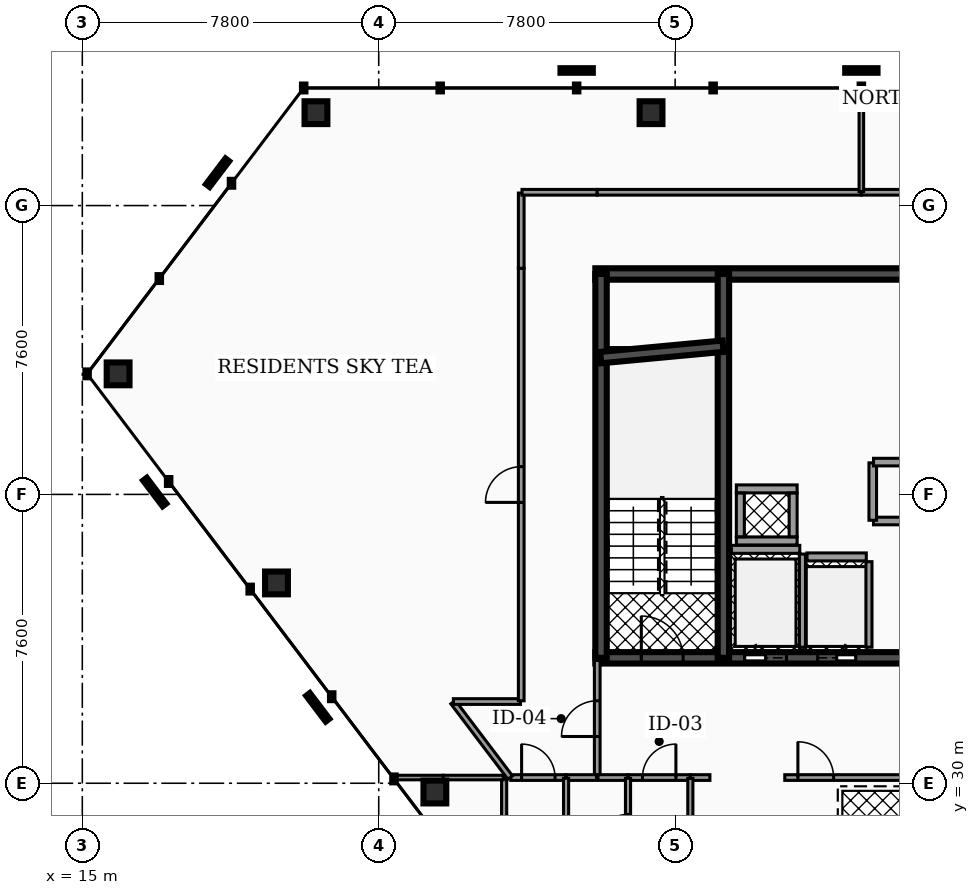
"""IFC4 building model, lengths in metres.
Left out: names, types, materials, properties, quantities, classifications, styles, units other than length and angle.
Written with IfcOpenShell. Run it as: python <this file> out.ifc"""

import sys

from ifc_helpers import new_model, si_unit, direction, frame, frame_2d, origin, origin_2d, place, context, subcontext, project, spatial, rectangle, hollow_rectangle, extrude, element, fill, save


model = new_model("IFC4")
c1 = context("Model", 3, precision=1e-05, world=origin(), true_north=direction((0.0, 1.0)))
c2 = subcontext(c1, "Body", "Model", "MODEL_VIEW")
j1 = project(units=[si_unit("LENGTHUNIT", "METRE"), si_unit("PLANEANGLEUNIT", "RADIAN")], contexts=[c1])
p1 = place(None, origin())
s1 = spatial("IfcSite", under=j1, at=p1, CompositionType="ELEMENT")
p2 = place(p1, origin())
s2 = spatial("IfcBuilding", under=s1, at=p2, CompositionType="ELEMENT")
p3 = place(p2, frame((0.0, 0.0, 218.96)))
s3 = spatial("IfcBuildingStorey", under=s2, at=p3, CompositionType="ELEMENT", Elevation=218.96)
p4 = place(p3, frame((28.5, 43.4, 0.0), z_axis=(0.0, 0.0, 1.0), x_axis=(1.0, 0.0, 0.0)))
e1 = element("IfcWall", 1, at=p4, inside=s3, PredefinedType="SHEAR", context=c2, shape_type="SweptSolid", body=[
    extrude(rectangle(XDim=19.86, YDim=0.3, at=frame_2d((9.93, 0.0))), origin(), (0.0, 0.0, 1.0), 3.18),
])
p5 = place(p3, frame((28.5, 33.3, 0.0), z_axis=(0.0, 0.0, 1.0), x_axis=(1.0, 0.0, 0.0)))
e2 = element("IfcWall", 2, at=p5, inside=s3, PredefinedType="SHEAR", context=c2, shape_type="SweptSolid", body=[
    extrude(rectangle(XDim=19.86, YDim=0.3, at=frame_2d((9.93, 0.0))), origin(), (0.0, 0.0, 1.0), 3.18),
])
p6 = place(p5, frame((3.93, 0.0, 0.0)))
e3 = element("IfcOpeningElement", 3, at=p6, cuts=e2, PredefinedType="OPENING", context=c2, shape_type="SweptSolid", body=[
    extrude(rectangle(XDim=1.1, YDim=2.15, at=frame_2d((0.55, 1.075))), frame((0.0, 0.16, 0.0), z_axis=(0.0, -1.0, 0.0), x_axis=(1.0, 0.0, 0.0)), (0.0, 0.0, 1.0), 0.32),
])
p7 = place(p5, frame((14.77, 0.0, 0.0)))
e4 = element("IfcOpeningElement", 4, at=p7, cuts=e2, PredefinedType="OPENING", context=c2, shape_type="SweptSolid", body=[
    extrude(rectangle(XDim=1.1, YDim=2.15, at=frame_2d((0.55, 1.075))), frame((0.0, 0.16, 0.0), z_axis=(0.0, -1.0, 0.0), x_axis=(1.0, 0.0, 0.0)), (0.0, 0.0, 1.0), 0.32),
])
p8 = place(p5, frame((11.25, 0.0, 0.0)))
e5 = element("IfcOpeningElement", 5, at=p8, cuts=e2, PredefinedType="OPENING", context=c2, shape_type="SweptSolid", body=[
    extrude(rectangle(XDim=1.0, YDim=2.1, at=frame_2d((0.5, 1.05))), frame((0.0, 0.16, 0.0), z_axis=(0.0, -1.0, 0.0), x_axis=(1.0, 0.0, 0.0)), (0.0, 0.0, 1.0), 0.32),
])
p9 = place(p5, frame((12.95, 0.0, 0.0)))
e6 = element("IfcOpeningElement", 6, at=p9, cuts=e2, PredefinedType="OPENING", context=c2, shape_type="SweptSolid", body=[
    extrude(rectangle(XDim=1.0, YDim=2.1, at=frame_2d((0.5, 1.05))), frame((0.0, 0.16, 0.0), z_axis=(0.0, -1.0, 0.0), x_axis=(1.0, 0.0, 0.0)), (0.0, 0.0, 1.0), 0.32),
])
p10 = place(p5, frame((5.85, 0.0, 0.0)))
e7 = element("IfcOpeningElement", 7, at=p10, cuts=e2, PredefinedType="OPENING", context=c2, shape_type="SweptSolid", body=[
    extrude(rectangle(XDim=1.0, YDim=2.1, at=frame_2d((0.5, 1.05))), frame((0.0, 0.16, 0.0), z_axis=(0.0, -1.0, 0.0), x_axis=(1.0, 0.0, 0.0)), (0.0, 0.0, 1.0), 0.32),
])
p11 = place(p5, frame((1.21, 0.0, 0.0)))
e8 = element("IfcOpeningElement", 8, at=p11, cuts=e2, PredefinedType="OPENING", context=c2, shape_type="SweptSolid", body=[
    extrude(rectangle(XDim=1.1, YDim=2.2, at=frame_2d((0.55, 1.1))), frame((0.0, 0.16, 0.0), z_axis=(0.0, -1.0, 0.0), x_axis=(1.0, 0.0, 0.0)), (0.0, 0.0, 1.0), 0.32),
])
p12 = place(p5, frame((9.34, 0.0, 0.0)))
e9 = element("IfcOpeningElement", 9, at=p12, cuts=e2, PredefinedType="OPENING", context=c2, shape_type="SweptSolid", body=[
    extrude(rectangle(XDim=1.12, YDim=2.05, at=frame_2d((0.56, 1.025))), frame((0.0, 0.16, 0.0), z_axis=(0.0, -1.0, 0.0), x_axis=(1.0, 0.0, 0.0)), (0.0, 0.0, 1.0), 0.32),
])
p13 = place(p5, frame((17.55, 0.0, 0.0)))
e10 = element("IfcOpeningElement", 10, at=p13, cuts=e2, PredefinedType="OPENING", context=c2, shape_type="SweptSolid", body=[
    extrude(rectangle(XDim=1.1, YDim=2.2, at=frame_2d((0.55, 1.1))), frame((0.0, 0.16, 0.0), z_axis=(0.0, -1.0, 0.0), x_axis=(1.0, 0.0, 0.0)), (0.0, 0.0, 1.0), 0.32),
])
for number, where, z_axis, x_axis in (
    (11, (28.65, 33.3, 0.0), (0.0, 0.0, 1.0), (0.0, 1.0, 0.0)),
    (12, (31.87, 33.3, 0.0), (0.0, 0.0, 1.0), (0.0, 1.0, 0.0)),
):
    element("IfcWall", number, at=place(p3, frame(where, z_axis=z_axis, x_axis=x_axis)), inside=s3, PredefinedType="SHEAR", context=c2, shape_type="SweptSolid", body=[
        extrude(rectangle(XDim=10.1, YDim=0.3, at=frame_2d((5.05, 0.0))), origin(), (0.0, 0.0, 1.0), 3.18),
    ])
p14 = place(p3, frame((28.64, 41.2, 0.0), z_axis=(0.0, 0.0, 1.0), x_axis=(0.995687118776, 0.092774789157, 0.0)))
e13 = element("IfcWall", 13, at=p14, inside=s3, PredefinedType="SHEAR", context=c2, shape_type="SweptSolid", body=[
    extrude(rectangle(XDim=3.234, YDim=0.3, at=frame_2d((1.617, 0.0))), origin(), (0.0, 0.0, 1.0), 3.18),
])
for number, where, z_axis, x_axis in (
    (14, (29.966, 47.644, 0.0), (0.0, 0.0, 1.0), (1.0, 0.0, 0.0)),
    (15, (21.148, 47.644, 0.0), (0.0, 0.0, 1.0), (1.0, 0.0, 0.0)),
    (16, (15.942, 40.772, 0.0), (0.0, 0.0, 1.0), (1.0, 0.0, 0.0)),
    (17, (20.11, 35.271, 0.0), (0.0, 0.0, 1.0), (1.0, 0.0, 0.0)),
    (18, (24.278, 29.769, 0.0), (0.0, 0.0, 1.0), (1.0, 0.0, 0.0)),
):
    element("IfcColumn", number, at=place(p3, frame(where, z_axis=z_axis, x_axis=x_axis)), inside=s3, PredefinedType="COLUMN", context=c2, shape_type="SweptSolid", body=[
        extrude(hollow_rectangle(XDim=0.6, YDim=0.6, WallThickness=0.03, at=origin_2d()), origin(), (0.0, 0.0, 1.0), 3.18),
    ])
p15 = place(p3, frame((32.08, 36.155, 0.0), z_axis=(0.0, 0.0, 1.0), x_axis=(1.0, 0.0, 0.0)))
e19 = element("IfcWall", 19, at=p15, inside=s3, PredefinedType="SOLIDWALL", context=c2, shape_type="SweptSolid", body=[
    extrude(rectangle(XDim=1.8, YDim=0.21, at=frame_2d((0.9, 0.0))), origin(), (0.0, 0.0, 1.0), 3.18),
])
p16 = place(p3, frame((33.95, 33.58, 0.0), z_axis=(0.0, 0.0, 1.0), x_axis=(0.0, 1.0, 0.0)))
e20 = element("IfcWall", 20, at=p16, inside=s3, PredefinedType="SOLIDWALL", context=c2, shape_type="SweptSolid", body=[
    extrude(rectangle(XDim=2.45, YDim=0.16, at=frame_2d((1.225, 0.0))), origin(), (0.0, 0.0, 1.0), 3.18),
])
p17 = place(p3, frame((34.07, 35.955, 0.0), z_axis=(0.0, 0.0, 1.0), x_axis=(1.0, 0.0, 0.0)))
e21 = element("IfcWall", 21, at=p17, inside=s3, PredefinedType="SOLIDWALL", context=c2, shape_type="SweptSolid", body=[
    extrude(rectangle(XDim=1.56, YDim=0.21, at=frame_2d((0.78, 0.0))), origin(), (0.0, 0.0, 1.0), 3.18),
])
p18 = place(p3, frame((35.7, 33.58, 0.0), z_axis=(0.0, 0.0, 1.0), x_axis=(0.0, 1.0, 0.0)))
e22 = element("IfcWall", 22, at=p18, inside=s3, PredefinedType="SOLIDWALL", context=c2, shape_type="SweptSolid", body=[
    extrude(rectangle(XDim=2.25, YDim=0.16, at=frame_2d((1.125, 0.0))), origin(), (0.0, 0.0, 1.0), 3.18),
])
for number, where, z_axis, x_axis in (
    (23, (32.21, 36.375, 0.0), (0.0, 0.0, 1.0), (1.0, 0.0, 0.0)),
    (24, (32.21, 37.745, 0.0), (0.0, 0.0, 1.0), (1.0, 0.0, 0.0)),
):
    element("IfcWall", number, at=place(p3, frame(where, z_axis=z_axis, x_axis=x_axis)), inside=s3, PredefinedType="SOLIDWALL", context=c2, shape_type="SweptSolid", body=[
        extrude(rectangle(XDim=1.6, YDim=0.21, at=frame_2d((0.8, 0.0))), origin(), (0.0, 0.0, 1.0), 3.18),
    ])
for number, where, z_axis, x_axis in (
    (25, (32.315, 36.485, 0.0), (0.0, 0.0, 1.0), (0.0, 1.0, 0.0)),
    (26, (33.705, 36.485, 0.0), (0.0, 0.0, 1.0), (0.0, 1.0, 0.0)),
):
    element("IfcWall", number, at=place(p3, frame(where, z_axis=z_axis, x_axis=x_axis)), inside=s3, PredefinedType="SOLIDWALL", context=c2, shape_type="SweptSolid", body=[
        extrude(rectangle(XDim=1.15, YDim=0.21, at=frame_2d((0.575, 0.0))), origin(), (0.0, 0.0, 1.0), 3.18),
    ])
p19 = place(p3, frame((35.82, 36.9, 0.0), z_axis=(0.0, 0.0, 1.0), x_axis=(1.0, 0.0, 0.0)))
e27 = element("IfcWall", 27, at=p19, inside=s3, PredefinedType="PARTITIONING", context=c2, shape_type="SweptSolid", body=[
    extrude(rectangle(XDim=1.71, YDim=0.2, at=frame_2d((0.855, 0.0))), origin(), (0.0, 0.0, 1.0), 2.235),
])
p20 = place(p3, frame((35.8, 36.92, 0.0), z_axis=(0.0, 0.0, 1.0), x_axis=(0.0, 1.0, 0.0)))
e28 = element("IfcWall", 28, at=p20, inside=s3, PredefinedType="PARTITIONING", context=c2, shape_type="SweptSolid", body=[
    extrude(rectangle(XDim=1.51, YDim=0.2, at=frame_2d((0.755, 0.0))), origin(), (0.0, 0.0, 1.0), 2.235),
])
p21 = place(p3, frame((35.82, 38.45, 0.0), z_axis=(0.0, 0.0, 1.0), x_axis=(1.0, 0.0, 0.0)))
e29 = element("IfcWall", 29, at=p21, inside=s3, PredefinedType="PARTITIONING", context=c2, shape_type="SweptSolid", body=[
    extrude(rectangle(XDim=1.71, YDim=0.2, at=frame_2d((0.855, 0.0))), origin(), (0.0, 0.0, 1.0), 2.235),
])
p22 = place(p3, frame((28.55, 30.17, 0.0), z_axis=(0.0, 0.0, 1.0), x_axis=(0.0, 1.0, 0.0)))
e30 = element("IfcWall", 30, at=p22, inside=s3, PredefinedType="PARTITIONING", context=c2, shape_type="SweptSolid", body=[
    extrude(rectangle(XDim=3.06, YDim=0.15, at=frame_2d((1.53, 0.0))), origin(), (0.0, 0.0, 1.0), 2.235),
])
p23 = place(p22, frame((1.06, 0.0, 0.0)))
e31 = element("IfcOpeningElement", 31, at=p23, cuts=e30, PredefinedType="OPENING", context=c2, shape_type="SweptSolid", body=[
    extrude(rectangle(XDim=0.94, YDim=2.05, at=frame_2d((0.47, 1.025))), frame((0.0, 0.085, 0.0), z_axis=(0.0, -1.0, 0.0), x_axis=(1.0, 0.0, 0.0)), (0.0, 0.0, 1.0), 0.17),
])
p24 = place(p3, frame((29.365, 30.15, 0.0), z_axis=(0.0, 0.0, 1.0), x_axis=(1.0, 0.0, 0.0)))
e32 = element("IfcWall", 32, at=p24, inside=s3, PredefinedType="PARTITIONING", context=c2, shape_type="SweptSolid", body=[
    extrude(rectangle(XDim=1.63, YDim=0.15, at=frame_2d((0.815, 0.0))), origin(), (0.0, 0.0, 1.0), 2.235),
])
p25 = place(p24, frame((0.375, 0.0, 0.0)))
e33 = element("IfcOpeningElement", 33, at=p25, cuts=e32, PredefinedType="OPENING", context=c2, shape_type="SweptSolid", body=[
    extrude(rectangle(XDim=0.88, YDim=2.05, at=frame_2d((0.44, 1.025))), frame((0.0, 0.085, 0.0), z_axis=(0.0, -1.0, 0.0), x_axis=(1.0, 0.0, 0.0)), (0.0, 0.0, 1.0), 0.17),
])
p26 = place(p3, frame((28.57, 30.15, 0.0), z_axis=(0.0, 0.0, 1.0), x_axis=(1.0, 0.0, 0.0)))
e34 = element("IfcWall", 34, at=p26, inside=s3, PredefinedType="PARTITIONING", context=c2, shape_type="SweptSolid", body=[
    extrude(rectangle(XDim=0.785, YDim=0.15, at=frame_2d((0.393, 0.0))), origin(), (0.0, 0.0, 1.0), 2.235),
])
p27 = place(p3, frame((33.485, 30.15, 0.0), z_axis=(0.0, 0.0, 1.0), x_axis=(1.0, 0.0, 0.0)))
e35 = element("IfcWall", 35, at=p27, inside=s3, PredefinedType="PARTITIONING", context=c2, shape_type="SweptSolid", body=[
    extrude(rectangle(XDim=8.03, YDim=0.15, at=frame_2d((4.015, 0.0))), origin(), (0.0, 0.0, 1.0), 2.235),
])
p28 = place(p27, frame((0.345, 0.0, 0.0)))
e36 = element("IfcOpeningElement", 36, at=p28, cuts=e35, PredefinedType="OPENING", context=c2, shape_type="SweptSolid", body=[
    extrude(rectangle(XDim=0.94, YDim=2.05, at=frame_2d((0.47, 1.025))), frame((0.0, 0.085, 0.0), z_axis=(0.0, -1.0, 0.0), x_axis=(1.0, 0.0, 0.0)), (0.0, 0.0, 1.0), 0.17),
])
p29 = place(p3, frame((31.005, 30.15, 0.0), z_axis=(0.0, 0.0, 1.0), x_axis=(1.0, 0.0, 0.0)))
e37 = element("IfcWall", 37, at=p29, inside=s3, PredefinedType="PARTITIONING", context=c2, shape_type="SweptSolid", body=[
    extrude(rectangle(XDim=0.51, YDim=0.15, at=frame_2d((0.255, 0.0))), origin(), (0.0, 0.0, 1.0), 2.235),
])
p30 = place(p3, frame((26.275, 30.15, 0.0), z_axis=(0.0, 0.0, 1.0), x_axis=(1.0, 0.0, 0.0)))
e38 = element("IfcWall", 38, at=p30, inside=s3, PredefinedType="PARTITIONING", context=c2, shape_type="SweptSolid", body=[
    extrude(rectangle(XDim=1.45, YDim=0.15, at=frame_2d((0.725, 0.0))), origin(), (0.0, 0.0, 1.0), 2.235),
])
p31 = place(p30, frame((0.285, 0.0, 0.0)))
e39 = element("IfcOpeningElement", 39, at=p31, cuts=e38, PredefinedType="OPENING", context=c2, shape_type="SweptSolid", body=[
    extrude(rectangle(XDim=0.88, YDim=2.05, at=frame_2d((0.44, 1.025))), frame((0.0, 0.085, 0.0), z_axis=(0.0, -1.0, 0.0), x_axis=(1.0, 0.0, 0.0)), (0.0, 0.0, 1.0), 0.17),
])
p32 = place(p3, frame((27.735, 30.15, 0.0), z_axis=(0.0, 0.0, 1.0), x_axis=(1.0, 0.0, 0.0)))
e40 = element("IfcWall", 40, at=p32, inside=s3, PredefinedType="PARTITIONING", context=c2, shape_type="SweptSolid", body=[
    extrude(rectangle(XDim=0.795, YDim=0.15, at=frame_2d((0.397, 0.0))), origin(), (0.0, 0.0, 1.0), 2.235),
])
p33 = place(p3, frame((24.757, 32.134, 0.0), z_axis=(0.0, 0.0, 1.0), x_axis=(0.603806698968, -0.797130773638, 0.0)))
e41 = element("IfcWall", 41, at=p33, inside=s3, PredefinedType="PARTITIONING", context=c2, shape_type="SweptSolid", body=[
    extrude(rectangle(XDim=2.489, YDim=0.15, at=frame_2d((1.245, 0.0))), origin(), (0.0, 0.0, 1.0), 2.235),
])
p34 = place(p3, frame((24.765, 32.15, 0.0), z_axis=(0.0, 0.0, 1.0), x_axis=(1.0, 0.0, 0.0)))
e42 = element("IfcWall", 42, at=p34, inside=s3, PredefinedType="PARTITIONING", context=c2, shape_type="SweptSolid", body=[
    extrude(rectangle(XDim=1.765, YDim=0.15, at=frame_2d((0.883, 0.0))), origin(), (0.0, 0.0, 1.0), 2.235),
])
p35 = place(p3, frame((26.55, 32.17, 0.0), z_axis=(0.0, 0.0, 1.0), x_axis=(0.0, 1.0, 0.0)))
e43 = element("IfcWall", 43, at=p35, inside=s3, PredefinedType="PARTITIONING", context=c2, shape_type="SweptSolid", body=[
    extrude(rectangle(XDim=11.38, YDim=0.15, at=frame_2d((5.69, 0.0))), origin(), (0.0, 0.0, 1.0), 2.235),
])
p36 = place(p35, frame((5.22, 0.0, 0.0)))
e44 = element("IfcOpeningElement", 44, at=p36, cuts=e43, PredefinedType="OPENING", context=c2, shape_type="SweptSolid", body=[
    extrude(rectangle(XDim=0.94, YDim=2.05, at=frame_2d((0.47, 1.025))), frame((0.0, 0.085, 0.0), z_axis=(0.0, -1.0, 0.0), x_axis=(1.0, 0.0, 0.0)), (0.0, 0.0, 1.0), 0.17),
])
for number, where, z_axis, x_axis in (
    (45, (26.55, 43.55, 0.0), (0.0, 0.0, 1.0), (0.0, 1.0, 0.0)),
    (46, (26.57, 45.55, 0.0), (0.0, 0.0, 1.0), (1.0, 0.0, 0.0)),
):
    element("IfcWall", number, at=place(p3, frame(where, z_axis=z_axis, x_axis=x_axis)), inside=s3, PredefinedType="PARTITIONING", context=c2, shape_type="SweptSolid", body=[
        extrude(rectangle(XDim=1.98, YDim=0.15, at=frame_2d((0.99, 0.0))), origin(), (0.0, 0.0, 1.0), 2.235),
    ])
p37 = place(p3, frame((28.55, 45.55, 0.0), z_axis=(0.0, 0.0, 1.0), x_axis=(1.0, 0.0, 0.0)))
e47 = element("IfcWall", 47, at=p37, inside=s3, PredefinedType="PARTITIONING", context=c2, shape_type="SweptSolid", body=[
    extrude(rectangle(XDim=6.945, YDim=0.15, at=frame_2d((3.473, 0.0))), origin(), (0.0, 0.0, 1.0), 2.235),
])
p38 = place(p3, frame((35.505, 45.55, 0.0), z_axis=(0.0, 0.0, 1.0), x_axis=(1.0, 0.0, 0.0)))
e48 = element("IfcWall", 48, at=p38, inside=s3, PredefinedType="PARTITIONING", context=c2, shape_type="SweptSolid", body=[
    extrude(rectangle(XDim=6.345, YDim=0.15, at=frame_2d((3.173, 0.0))), origin(), (0.0, 0.0, 1.0), 2.235),
])
p39 = place(p3, frame((29.36, 27.37, 0.0), z_axis=(0.0, 0.0, 1.0), x_axis=(0.0, 1.0, 0.0)))
e49 = element("IfcWall", 49, at=p39, inside=s3, PredefinedType="PARTITIONING", context=c2, shape_type="SweptSolid", body=[
    extrude(rectangle(XDim=2.76, YDim=0.135, at=frame_2d((1.38, 0.0))), origin(), (0.0, 0.0, 1.0), 2.235),
])
p40 = place(p39, frame((0.95, 0.0, 0.0)))
e50 = element("IfcOpeningElement", 50, at=p40, cuts=e49, PredefinedType="OPENING", context=c2, shape_type="SweptSolid", body=[
    extrude(rectangle(XDim=0.86, YDim=2.05, at=frame_2d((0.43, 1.025))), frame((0.0, 0.077, 0.0), z_axis=(0.0, -1.0, 0.0), x_axis=(1.0, 0.0, 0.0)), (0.0, 0.0, 1.0), 0.155),
])
for number, where, z_axis, x_axis in (
    (51, (31.0, 27.37, 0.0), (0.0, 0.0, 1.0), (0.0, 1.0, 0.0)),
    (52, (27.73, 27.37, 0.0), (0.0, 0.0, 1.0), (0.0, 1.0, 0.0)),
    (53, (26.1, 27.37, 0.0), (0.0, 0.0, 1.0), (0.0, 1.0, 0.0)),
):
    element("IfcWall", number, at=place(p3, frame(where, z_axis=z_axis, x_axis=x_axis)), inside=s3, PredefinedType="PARTITIONING", context=c2, shape_type="SweptSolid", body=[
        extrude(rectangle(XDim=2.76, YDim=0.135, at=frame_2d((1.38, 0.0))), origin(), (0.0, 0.0, 1.0), 2.235),
    ])
p41 = place(p3, frame((23.189, 30.15, 0.0), z_axis=(0.0, 0.0, 1.0), x_axis=(1.0, 0.0, 0.0)))
e54 = element("IfcWall", 54, at=p41, inside=s3, PredefinedType="PARTITIONING", context=c2, shape_type="SweptSolid", body=[
    extrude(rectangle(XDim=1.311, YDim=0.12, at=frame_2d((0.656, 0.0))), origin(), (0.0, 0.0, 1.0), 2.235),
])
p42 = place(p3, frame((24.5, 30.15, 0.0), z_axis=(0.0, 0.0, 1.0), x_axis=(1.0, 0.0, 0.0)))
e55 = element("IfcWall", 55, at=p42, inside=s3, PredefinedType="PARTITIONING", context=c2, shape_type="SweptSolid", body=[
    extrude(rectangle(XDim=1.58, YDim=0.12, at=frame_2d((0.79, 0.0))), origin(), (0.0, 0.0, 1.0), 2.235),
])
p43 = place(p3, frame((35.5, 45.57, 0.0), z_axis=(0.0, 0.0, 1.0), x_axis=(0.0, 1.0, 0.0)))
e56 = element("IfcWall", 56, at=p43, inside=s3, PredefinedType="PARTITIONING", context=c2, shape_type="SweptSolid", body=[
    extrude(rectangle(XDim=2.709, YDim=0.12, at=frame_2d((1.354, 0.0))), origin(), (0.0, 0.0, 1.0), 2.235),
])
p44 = place(p6, origin())
e57 = element("IfcDoor", 57, at=p44, inside=s3, OperationType="SLIDING_TO_LEFT", PredefinedType="DOOR", context=c2, shape_type="SweptSolid", body=[
    extrude(rectangle(XDim=1.1, YDim=2.15, at=frame_2d((0.55, 1.075))), frame((0.0, 0.025, 0.0), z_axis=(0.0, -1.0, 0.0), x_axis=(1.0, 0.0, 0.0)), (0.0, 0.0, 1.0), 0.05),
])
fill(e3, e57)
p45 = place(p10, origin())
e58 = element("IfcDoor", 58, at=p45, inside=s3, OperationType="SLIDING_TO_RIGHT", PredefinedType="DOOR", context=c2, shape_type="SweptSolid", body=[
    extrude(rectangle(XDim=1.0, YDim=2.1, at=frame_2d((0.5, 1.05))), frame((0.0, 0.025, 0.0), z_axis=(0.0, -1.0, 0.0), x_axis=(1.0, 0.0, 0.0)), (0.0, 0.0, 1.0), 0.05),
])
fill(e7, e58)
p46 = place(p11, origin())
e59 = element("IfcDoor", 59, at=p46, inside=s3, OperationType="SINGLE_SWING_LEFT", PredefinedType="DOOR", context=c2, shape_type="SweptSolid", body=[
    extrude(rectangle(XDim=1.1, YDim=2.2, at=frame_2d((0.55, 1.1))), frame((0.0, 0.025, 0.0), z_axis=(0.0, -1.0, 0.0), x_axis=(1.0, 0.0, 0.0)), (0.0, 0.0, 1.0), 0.05),
])
fill(e8, e59)
p47 = place(p23, origin())
e60 = element("IfcDoor", 60, at=p47, inside=s3, OperationType="SINGLE_SWING_LEFT", PredefinedType="DOOR", context=c2, shape_type="SweptSolid", body=[
    extrude(rectangle(XDim=0.94, YDim=2.05, at=frame_2d((0.47, 1.025))), frame((0.0, 0.025, 0.0), z_axis=(0.0, -1.0, 0.0), x_axis=(1.0, 0.0, 0.0)), (0.0, 0.0, 1.0), 0.05),
])
fill(e31, e60)
p48 = place(p25, origin())
e61 = element("IfcDoor", 61, at=p48, inside=s3, OperationType="SINGLE_SWING_RIGHT", PredefinedType="DOOR", context=c2, shape_type="SweptSolid", body=[
    extrude(rectangle(XDim=0.88, YDim=2.05, at=frame_2d((0.44, 1.025))), frame((0.0, 0.025, 0.0), z_axis=(0.0, -1.0, 0.0), x_axis=(1.0, 0.0, 0.0)), (0.0, 0.0, 1.0), 0.05),
])
fill(e33, e61)
p49 = place(p28, origin())
e62 = element("IfcDoor", 62, at=p49, inside=s3, OperationType="SINGLE_SWING_LEFT", PredefinedType="DOOR", context=c2, shape_type="SweptSolid", body=[
    extrude(rectangle(XDim=0.94, YDim=2.05, at=frame_2d((0.47, 1.025))), frame((0.0, 0.025, 0.0), z_axis=(0.0, -1.0, 0.0), x_axis=(1.0, 0.0, 0.0)), (0.0, 0.0, 1.0), 0.05),
])
fill(e36, e62)
p50 = place(p31, origin())
e63 = element("IfcDoor", 63, at=p50, inside=s3, OperationType="SINGLE_SWING_LEFT", PredefinedType="DOOR", context=c2, shape_type="SweptSolid", body=[
    extrude(rectangle(XDim=0.88, YDim=2.05, at=frame_2d((0.44, 1.025))), frame((0.0, 0.025, 0.0), z_axis=(0.0, -1.0, 0.0), x_axis=(1.0, 0.0, 0.0)), (0.0, 0.0, 1.0), 0.05),
])
fill(e39, e63)
p51 = place(p36, origin())
e64 = element("IfcDoor", 64, at=p51, inside=s3, OperationType="SINGLE_SWING_LEFT", PredefinedType="DOOR", context=c2, shape_type="SweptSolid", body=[
    extrude(rectangle(XDim=0.94, YDim=2.05, at=frame_2d((0.47, 1.025))), frame((0.0, 0.025, 0.0), z_axis=(0.0, -1.0, 0.0), x_axis=(1.0, 0.0, 0.0)), (0.0, 0.0, 1.0), 0.05),
])
fill(e44, e64)
p52 = place(p40, origin())
e65 = element("IfcDoor", 65, at=p52, inside=s3, OperationType="SINGLE_SWING_LEFT", PredefinedType="DOOR", context=c2, shape_type="SweptSolid", body=[
    extrude(rectangle(XDim=0.86, YDim=2.05, at=frame_2d((0.43, 1.025))), frame((0.0, 0.025, 0.0), z_axis=(0.0, -1.0, 0.0), x_axis=(1.0, 0.0, 0.0)), (0.0, 0.0, 1.0), 0.05),
])
fill(e50, e65)
save(model, sys.argv[1])
